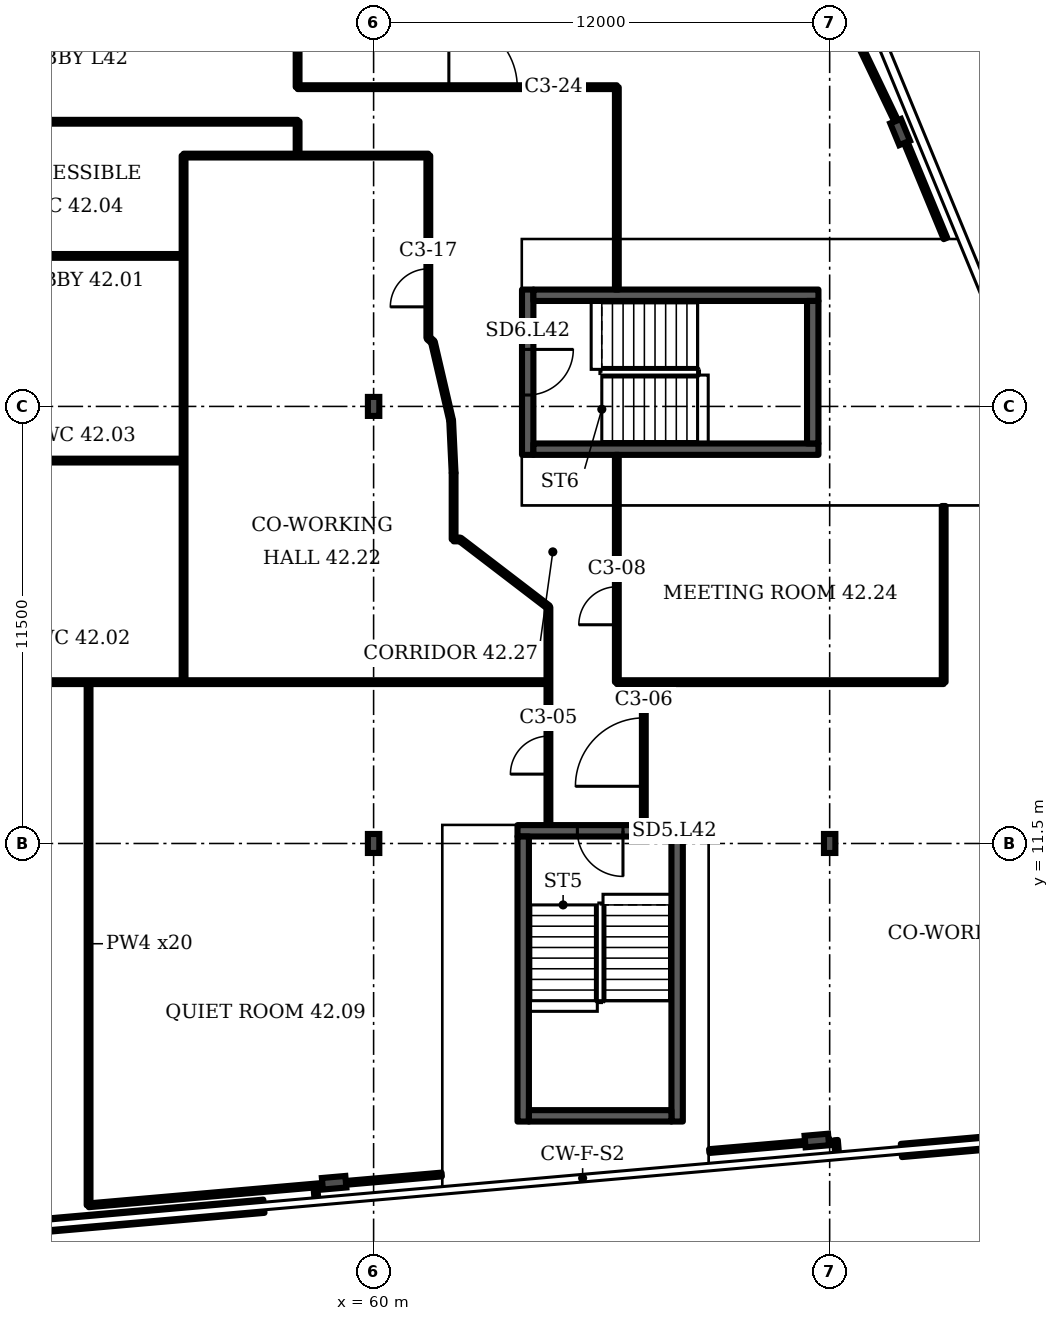
"""IFC4 building model, lengths in metres.
Left out: names, types, materials, properties, quantities, classifications, styles, units other than length and angle.
Written with IfcOpenShell. Run it as: python <this file> out.ifc"""

import sys

from ifc_helpers import new_model, si_unit, direction, frame, frame_2d, origin, origin_2d, place, context, subcontext, project, spatial, rectangle, i_section, extrude, element, fill, save


model = new_model("IFC4")
c1 = context("Model", 3, precision=1e-05, world=origin(), true_north=direction((0.0, 1.0)))
c2 = subcontext(c1, "Body", "Model", "MODEL_VIEW")
j1 = project(units=[si_unit("LENGTHUNIT", "METRE"), si_unit("PLANEANGLEUNIT", "RADIAN")], contexts=[c1])
p1 = place(None, origin())
s1 = spatial("IfcSite", under=j1, at=p1, CompositionType="ELEMENT")
p2 = place(p1, origin())
s2 = spatial("IfcBuilding", under=s1, at=p2, CompositionType="ELEMENT")
p3 = place(p2, frame((0.0, 0.0, 173.5)))
s3 = spatial("IfcBuildingStorey", under=s2, at=p3, CompositionType="ELEMENT", Elevation=173.5)
for number, where, z_axis, x_axis in (
    (1, (58.961, 2.573, 0.0), (0.0, 0.0, 1.0), (0.087, -0.996, 0.0)),
    (2, (71.662, 3.685, 0.0), (0.0, 0.0, 1.0), (0.087, -0.996, 0.0)),
    (3, (73.854, 30.219, 0.0), (0.0, 0.0, 1.0), (0.924, 0.382, 0.0)),
):
    element("IfcColumn", number, at=place(p3, frame(where, z_axis=z_axis, x_axis=x_axis)), inside=s3, PredefinedType="COLUMN", context=c2, shape_type="SweptSolid", body=[
        extrude(i_section(OverallWidth=0.305, OverallDepth=0.62, WebThickness=0.021, FlangeThickness=0.04, FilletRadius=0.027, at=origin_2d()), origin(), (0.0, 0.0, 1.0), 3.6),
    ])
for number, where, z_axis, x_axis in (
    (4, (60.0, 11.5, 0.0), (0.0, 0.0, 1.0), (1.0, 0.0, 0.0)),
    (5, (72.0, 11.5, 0.0), (0.0, 0.0, 1.0), (1.0, 0.0, 0.0)),
    (6, (60.0, 23.0, 0.0), (0.0, 0.0, 1.0), (1.0, 0.0, 0.0)),
):
    element("IfcColumn", number, at=place(p3, frame(where, z_axis=z_axis, x_axis=x_axis)), inside=s3, PredefinedType="COLUMN", context=c2, shape_type="SweptSolid", body=[
        extrude(i_section(OverallWidth=0.3, OverallDepth=0.5, WebThickness=0.014, FlangeThickness=0.028, FilletRadius=0.027, at=origin_2d()), origin(), (0.0, 0.0, 1.0), 3.6),
    ])
p4 = place(p3, frame((46.045, 0.987, 0.0), z_axis=(0.0, 0.0, 1.0), x_axis=(0.996193, 0.087171, 0.0)))
e7 = element("IfcWall", 7, at=p4, inside=s3, PredefinedType="SOLIDWALL", context=c2, shape_type="SweptSolid", body=[
    extrude(rectangle(XDim=11.11, YDim=0.35, at=frame_2d((5.555, 0.0))), origin(), (0.0, 0.0, 1.0), 1.0),
])
p5 = place(p3, frame((73.887, 3.423, 0.0), z_axis=(0.0, 0.0, 1.0), x_axis=(0.996197, 0.087145, 0.0)))
e8 = element("IfcWall", 8, at=p5, inside=s3, PredefinedType="SOLIDWALL", context=c2, shape_type="SweptSolid", body=[
    extrude(rectangle(XDim=9.323, YDim=0.35, at=frame_2d((4.662, 0.0))), origin(), (0.0, 0.0, 1.0), 1.0),
])
p6 = place(p3, frame((63.786, 11.834, 0.0), z_axis=(0.0, 0.0, 1.0), x_axis=(1.0, 0.0, 0.0)))
e9 = element("IfcWall", 9, at=p6, inside=s3, PredefinedType="SHEAR", context=c2, shape_type="SweptSolid", body=[
    extrude(rectangle(XDim=4.35, YDim=0.3, at=frame_2d((2.175, 0.0))), origin(), (0.0, 0.0, 1.0), 3.2),
])
p7 = place(p6, frame((1.575, 0.0, 0.0)))
e10 = element("IfcOpeningElement", 10, at=p7, cuts=e9, PredefinedType="OPENING", context=c2, shape_type="SweptSolid", body=[
    extrude(rectangle(XDim=1.2, YDim=2.1, at=frame_2d((0.6, 1.05))), frame((0.0, 0.16, 0.0), z_axis=(0.0, -1.0, 0.0), x_axis=(1.0, 0.0, 0.0)), (0.0, 0.0, 1.0), 0.32),
])
p8 = place(p3, frame((64.055, 21.725, 0.0), z_axis=(0.0, 0.0, 1.0), x_axis=(0.0, 1.0, 0.0)))
e11 = element("IfcWall", 11, at=p8, inside=s3, PredefinedType="SHEAR", context=c2, shape_type="SweptSolid", body=[
    extrude(rectangle(XDim=4.35, YDim=0.3, at=frame_2d((2.175, 0.0))), origin(), (0.0, 0.0, 1.0), 3.2),
])
p9 = place(p8, frame((1.575, 0.0, 0.0)))
e12 = element("IfcOpeningElement", 12, at=p9, cuts=e11, PredefinedType="OPENING", context=c2, shape_type="SweptSolid", body=[
    extrude(rectangle(XDim=1.2, YDim=2.1, at=frame_2d((0.6, 1.05))), frame((0.0, 0.16, 0.0), z_axis=(0.0, -1.0, 0.0), x_axis=(1.0, 0.0, 0.0)), (0.0, 0.0, 1.0), 0.32),
])
p10 = place(p3, frame((46.91, 15.745, 0.0), z_axis=(0.0, 0.0, 1.0), x_axis=(1.0, 0.0, 0.0)))
e13 = element("IfcWall", 13, at=p10, inside=s3, PredefinedType="PARTITIONING", context=c2, shape_type="SweptSolid", body=[
    extrude(rectangle(XDim=17.69, YDim=0.1, at=frame_2d((8.845, 0.0))), origin(), (0.0, 0.0, 1.0), 3.2),
])
p11 = place(p3, frame((46.91, 30.49, 0.0), z_axis=(0.0, 0.0, 1.0), x_axis=(1.0, 0.0, 0.0)))
e14 = element("IfcWall", 14, at=p11, inside=s3, PredefinedType="PARTITIONING", context=c2, shape_type="SweptSolid", body=[
    extrude(rectangle(XDim=11.09, YDim=0.1, at=frame_2d((5.545, 0.0))), origin(), (0.0, 0.0, 1.0), 3.2),
])
p12 = place(p11, frame((0.235, 0.0, 0.0)))
e15 = element("IfcOpeningElement", 15, at=p12, cuts=e14, PredefinedType="OPENING", context=c2, shape_type="SweptSolid", body=[
    extrude(rectangle(XDim=1.1, YDim=2.1, at=frame_2d((0.55, 1.05))), frame((0.0, 0.06, 0.0), z_axis=(0.0, -1.0, 0.0), x_axis=(1.0, 0.0, 0.0)), (0.0, 0.0, 1.0), 0.12),
])
for number, where, z_axis, x_axis in (
    (16, (48.7, 21.575, 0.0), (0.0, 0.0, 1.0), (1.0, 0.0, 0.0)),
    (17, (48.7, 26.96, 0.0), (0.0, 0.0, 1.0), (1.0, 0.0, 0.0)),
):
    element("IfcWall", number, at=place(p3, frame(where, z_axis=z_axis, x_axis=x_axis)), inside=s3, PredefinedType="PARTITIONING", context=c2, shape_type="SweptSolid", body=[
        extrude(rectangle(XDim=6.3, YDim=0.1, at=frame_2d((3.15, 0.0))), origin(), (0.0, 0.0, 1.0), 3.2),
    ])
p13 = place(p3, frame((52.5, 1.98, 0.0), z_axis=(0.0, 0.0, 1.0), x_axis=(0.0, 1.0, 0.0)))
e18 = element("IfcWall", 18, at=p13, inside=s3, PredefinedType="PARTITIONING", context=c2, shape_type="SweptSolid", body=[
    extrude(rectangle(XDim=13.765, YDim=0.1, at=frame_2d((6.883, 0.0))), origin(), (0.0, 0.0, 1.0), 3.2),
])
p14 = place(p3, frame((52.5, 1.98, 0.0), z_axis=(0.0, 0.0, 1.0), x_axis=(0.99622, 0.086844, 0.0)))
e19 = element("IfcWall", 19, at=p14, inside=s3, PredefinedType="PARTITIONING", context=c2, shape_type="SweptSolid", body=[
    extrude(rectangle(XDim=9.328, YDim=0.1, at=frame_2d((4.664, 0.0))), origin(), (0.0, 0.0, 1.0), 2.58),
])
p15 = place(p3, frame((55.0, 15.745, 0.0), z_axis=(0.0, 0.0, 1.0), x_axis=(0.0, 1.0, 0.0)))
e20 = element("IfcWall", 20, at=p15, inside=s3, PredefinedType="PARTITIONING", context=c2, shape_type="SweptSolid", body=[
    extrude(rectangle(XDim=13.855, YDim=0.1, at=frame_2d((6.927, 0.0))), origin(), (0.0, 0.0, 1.0), 3.2),
])
p16 = place(p3, frame((55.0, 29.6, 0.0), z_axis=(0.0, 0.0, 1.0), x_axis=(1.0, 0.0, 0.0)))
e21 = element("IfcWall", 21, at=p16, inside=s3, PredefinedType="PARTITIONING", context=c2, shape_type="SweptSolid", body=[
    extrude(rectangle(XDim=6.44, YDim=0.1, at=frame_2d((3.22, 0.0))), origin(), (0.0, 0.0, 1.0), 3.2),
])
p17 = place(p3, frame((58.0, 29.6, 0.0), z_axis=(0.0, 0.0, 1.0), x_axis=(0.0, 1.0, 0.0)))
e22 = element("IfcWall", 22, at=p17, inside=s3, PredefinedType="PARTITIONING", context=c2, shape_type="SweptSolid", body=[
    extrude(rectangle(XDim=0.9, YDim=0.1, at=frame_2d((0.45, 0.0))), origin(), (0.0, 0.0, 1.0), 3.2),
])
p18 = place(p3, frame((58.0, 31.4, 0.0), z_axis=(0.0, 0.0, 1.0), x_axis=(0.0, 1.0, 0.0)))
e23 = element("IfcWall", 23, at=p18, inside=s3, PredefinedType="PARTITIONING", context=c2, shape_type="SweptSolid", body=[
    extrude(rectangle(XDim=2.58, YDim=0.1, at=frame_2d((1.29, 0.0))), origin(), (0.0, 0.0, 1.0), 3.2),
])
p19 = place(p3, frame((58.0, 31.4, 0.0), z_axis=(0.0, 0.0, 1.0), x_axis=(1.0, 0.0, 0.0)))
e24 = element("IfcWall", 24, at=p19, inside=s3, PredefinedType="PARTITIONING", context=c2, shape_type="SweptSolid", body=[
    extrude(rectangle(XDim=8.4, YDim=0.1, at=frame_2d((4.2, 0.0))), origin(), (0.0, 0.0, 1.0), 3.2),
])
p20 = place(p19, frame((3.98, 0.0, 0.0)))
e25 = element("IfcOpeningElement", 25, at=p20, cuts=e24, PredefinedType="OPENING", context=c2, shape_type="SweptSolid", body=[
    extrude(rectangle(XDim=1.8, YDim=2.1, at=frame_2d((0.9, 1.05))), frame((0.0, 0.06, 0.0), z_axis=(0.0, -1.0, 0.0), x_axis=(1.0, 0.0, 0.0)), (0.0, 0.0, 1.0), 0.12),
])
p21 = place(p3, frame((58.498, 2.102, 0.0), z_axis=(0.0, 0.0, 1.0), x_axis=(-0.083045, 0.996542, 0.0)))
e26 = element("IfcWall", 26, at=p21, inside=s3, PredefinedType="PARTITIONING", context=c2, shape_type="SweptSolid", body=[
    extrude(rectangle(XDim=0.4, YDim=0.1, at=frame_2d((0.2, 0.0))), origin(), (0.0, 0.0, 1.0), 3.2),
])
p22 = place(p3, frame((61.44, 24.8, 0.0), z_axis=(0.0, 0.0, 1.0), x_axis=(0.0, 1.0, 0.0)))
e27 = element("IfcWall", 27, at=p22, inside=s3, PredefinedType="PARTITIONING", context=c2, shape_type="SweptSolid", body=[
    extrude(rectangle(XDim=4.8, YDim=0.1, at=frame_2d((2.4, 0.0))), origin(), (0.0, 0.0, 1.0), 3.2),
])
p23 = place(p22, frame((0.82, 0.0, 0.0)))
e28 = element("IfcOpeningElement", 28, at=p23, cuts=e27, PredefinedType="OPENING", context=c2, shape_type="SweptSolid", body=[
    extrude(rectangle(XDim=1.0, YDim=2.1, at=frame_2d((0.5, 1.05))), frame((0.0, 0.06, 0.0), z_axis=(0.0, -1.0, 0.0), x_axis=(1.0, 0.0, 0.0)), (0.0, 0.0, 1.0), 0.12),
])
p24 = place(p3, frame((61.56, 24.695, 0.0), z_axis=(0.0, 0.0, 1.0), x_axis=(-0.752958, 0.658073, 0.0)))
e29 = element("IfcWall", 29, at=p24, inside=s3, PredefinedType="PARTITIONING", context=c2, shape_type="SweptSolid", body=[
    extrude(rectangle(XDim=0.159, YDim=0.1, at=frame_2d((0.08, 0.0))), origin(), (0.0, 0.0, 1.0), 3.2),
])
p25 = place(p3, frame((62.04, 22.63, 0.0), z_axis=(0.0, 0.0, 1.0), x_axis=(-0.226381, 0.974037, 0.0)))
e30 = element("IfcWall", 30, at=p25, inside=s3, PredefinedType="PARTITIONING", context=c2, shape_type="SweptSolid", body=[
    extrude(rectangle(XDim=2.12, YDim=0.1, at=frame_2d((1.06, 0.0))), origin(), (0.0, 0.0, 1.0), 3.2),
])
p26 = place(p3, frame((62.105, 19.5, 0.0), z_axis=(0.0, 0.0, 1.0), x_axis=(0.0, 1.0, 0.0)))
e31 = element("IfcWall", 31, at=p26, inside=s3, PredefinedType="PARTITIONING", context=c2, shape_type="SweptSolid", body=[
    extrude(rectangle(XDim=1.75, YDim=0.1, at=frame_2d((0.875, 0.0))), origin(), (0.0, 0.0, 1.0), 3.2),
])
p27 = place(p3, frame((62.105, 19.5, 0.0), z_axis=(0.0, 0.0, 1.0), x_axis=(1.0, 0.0, 0.0)))
e32 = element("IfcWall", 32, at=p27, inside=s3, PredefinedType="PARTITIONING", context=c2, shape_type="SweptSolid", body=[
    extrude(rectangle(XDim=0.17, YDim=0.1, at=frame_2d((0.085, 0.0))), origin(), (0.0, 0.0, 1.0), 3.2),
])
p28 = place(p3, frame((62.105, 21.25, 0.0), z_axis=(0.0, 0.0, 1.0), x_axis=(-0.047011, 0.998895, 0.0)))
e33 = element("IfcWall", 33, at=p28, inside=s3, PredefinedType="PARTITIONING", context=c2, shape_type="SweptSolid", body=[
    extrude(rectangle(XDim=1.381, YDim=0.1, at=frame_2d((0.691, 0.0))), origin(), (0.0, 0.0, 1.0), 3.2),
])
p29 = place(p3, frame((64.6, 12.004, 0.0), z_axis=(0.0, 0.0, 1.0), x_axis=(0.0, 1.0, 0.0)))
e34 = element("IfcWall", 34, at=p29, inside=s3, PredefinedType="PARTITIONING", context=c2, shape_type="SweptSolid", body=[
    extrude(rectangle(XDim=5.716, YDim=0.1, at=frame_2d((2.858, 0.0))), origin(), (0.0, 0.0, 1.0), 3.2),
])
p30 = place(p29, frame((1.321, 0.0, 0.0)))
e35 = element("IfcOpeningElement", 35, at=p30, cuts=e34, PredefinedType="OPENING", context=c2, shape_type="SweptSolid", body=[
    extrude(rectangle(XDim=1.0, YDim=2.1, at=frame_2d((0.5, 1.05))), frame((0.0, 0.06, 0.0), z_axis=(0.0, -1.0, 0.0), x_axis=(1.0, 0.0, 0.0)), (0.0, 0.0, 1.0), 0.12),
])
p31 = place(p3, frame((64.6, 17.72, 0.0), z_axis=(0.0, 0.0, 1.0), x_axis=(-0.794036, 0.607866, 0.0)))
e36 = element("IfcWall", 36, at=p31, inside=s3, PredefinedType="PARTITIONING", context=c2, shape_type="SweptSolid", body=[
    extrude(rectangle(XDim=2.928, YDim=0.1, at=frame_2d((1.464, 0.0))), origin(), (0.0, 0.0, 1.0), 3.2),
])
p32 = place(p3, frame((66.4, 15.745, 0.0), z_axis=(0.0, 0.0, 1.0), x_axis=(0.0, 1.0, 0.0)))
e37 = element("IfcWall", 37, at=p32, inside=s3, PredefinedType="PARTITIONING", context=c2, shape_type="SweptSolid", body=[
    extrude(rectangle(XDim=5.98, YDim=0.1, at=frame_2d((2.99, 0.0))), origin(), (0.0, 0.0, 1.0), 3.2),
])
p33 = place(p32, frame((1.51, 0.0, 0.0)))
e38 = element("IfcOpeningElement", 38, at=p33, cuts=e37, PredefinedType="OPENING", context=c2, shape_type="SweptSolid", body=[
    extrude(rectangle(XDim=1.0, YDim=2.1, at=frame_2d((0.5, 1.05))), frame((0.0, 0.06, 0.0), z_axis=(0.0, -1.0, 0.0), x_axis=(1.0, 0.0, 0.0)), (0.0, 0.0, 1.0), 0.12),
])
p34 = place(p3, frame((66.4, 15.745, 0.0), z_axis=(0.0, 0.0, 1.0), x_axis=(1.0, 0.0, 0.0)))
e39 = element("IfcWall", 39, at=p34, inside=s3, PredefinedType="PARTITIONING", context=c2, shape_type="SweptSolid", body=[
    extrude(rectangle(XDim=8.6, YDim=0.1, at=frame_2d((4.3, 0.0))), origin(), (0.0, 0.0, 1.0), 3.2),
])
p35 = place(p3, frame((66.4, 26.075, 0.0), z_axis=(0.0, 0.0, 1.0), x_axis=(0.0, 1.0, 0.0)))
e40 = element("IfcWall", 40, at=p35, inside=s3, PredefinedType="PARTITIONING", context=c2, shape_type="SweptSolid", body=[
    extrude(rectangle(XDim=5.325, YDim=0.1, at=frame_2d((2.663, 0.0))), origin(), (0.0, 0.0, 1.0), 3.2),
])
p36 = place(p3, frame((67.11, 12.004, 0.0), z_axis=(0.0, 0.0, 1.0), x_axis=(0.0, 1.0, 0.0)))
e41 = element("IfcWall", 41, at=p36, inside=s3, PredefinedType="PARTITIONING", context=c2, shape_type="SweptSolid", body=[
    extrude(rectangle(XDim=3.741, YDim=0.1, at=frame_2d((1.871, 0.0))), origin(), (0.0, 0.0, 1.0), 3.2),
])
p37 = place(p36, frame((1.001, 0.0, 0.0)))
e42 = element("IfcOpeningElement", 42, at=p37, cuts=e41, PredefinedType="OPENING", context=c2, shape_type="SweptSolid", body=[
    extrude(rectangle(XDim=1.8, YDim=2.1, at=frame_2d((0.9, 1.05))), frame((0.0, 0.06, 0.0), z_axis=(0.0, -1.0, 0.0), x_axis=(1.0, 0.0, 0.0)), (0.0, 0.0, 1.0), 0.12),
])
p38 = place(p3, frame((68.831, 3.407, 0.0), z_axis=(0.0, 0.0, 1.0), x_axis=(0.996308, 0.085898, 0.0)))
e43 = element("IfcWall", 43, at=p38, inside=s3, PredefinedType="PARTITIONING", context=c2, shape_type="SweptSolid", body=[
    extrude(rectangle(XDim=3.18, YDim=0.1, at=frame_2d((1.59, 0.0))), origin(), (0.0, 0.0, 1.0), 2.58),
])
p39 = place(p3, frame((72.198, 3.3, 0.0), z_axis=(0.0, 0.0, 1.0), x_axis=(-0.083759, 0.996486, 0.0)))
e44 = element("IfcWall", 44, at=p39, inside=s3, PredefinedType="PARTITIONING", context=c2, shape_type="SweptSolid", body=[
    extrude(rectangle(XDim=0.396, YDim=0.1, at=frame_2d((0.198, 0.0))), origin(), (0.0, 0.0, 1.0), 3.2),
])
p40 = place(p3, frame((73.885, 30.23, 0.0), z_axis=(0.0, 0.0, 1.0), x_axis=(-0.432129, 0.901808, 0.0)))
e45 = element("IfcWall", 45, at=p40, inside=s3, PredefinedType="PARTITIONING", context=c2, shape_type="SweptSolid", body=[
    extrude(rectangle(XDim=13.029, YDim=0.1, at=frame_2d((6.515, 0.0))), origin(), (0.0, 0.0, 1.0), 2.58),
])
p41 = place(p3, frame((75.0, 15.745, 0.0), z_axis=(0.0, 0.0, 1.0), x_axis=(0.0, 1.0, 0.0)))
e46 = element("IfcWall", 46, at=p41, inside=s3, PredefinedType="PARTITIONING", context=c2, shape_type="SweptSolid", body=[
    extrude(rectangle(XDim=4.635, YDim=0.1, at=frame_2d((2.317, 0.0))), origin(), (0.0, 0.0, 1.0), 3.2),
])
p42 = place(p3, frame((75.047, 27.42, 0.0), z_axis=(0.0, 0.0, 1.0), x_axis=(-0.382024, 0.924148, 0.0)))
e47 = element("IfcWall", 47, at=p42, inside=s3, PredefinedType="PARTITIONING", context=c2, shape_type="SweptSolid", body=[
    extrude(rectangle(XDim=3.041, YDim=0.1, at=frame_2d((1.521, 0.0))), origin(), (0.0, 0.0, 1.0), 2.58),
])
for number, where, z_axis, x_axis in (
    (48, (63.936, 4.184, 0.0), (0.0, 0.0, 1.0), (0.0, 1.0, 0.0)),
    (49, (67.986, 4.184, 0.0), (0.0, 0.0, 1.0), (0.0, 1.0, 0.0)),
):
    element("IfcWall", number, at=place(p3, frame(where, z_axis=z_axis, x_axis=x_axis)), inside=s3, PredefinedType="SHEAR", context=c2, shape_type="SweptSolid", body=[
        extrude(rectangle(XDim=7.5, YDim=0.3, at=frame_2d((3.75, 0.0))), origin(), (0.0, 0.0, 1.0), 3.2),
    ])
p43 = place(p3, frame((64.086, 4.334, 0.0), z_axis=(0.0, 0.0, 1.0), x_axis=(1.0, 0.0, 0.0)))
e50 = element("IfcWall", 50, at=p43, inside=s3, PredefinedType="SHEAR", context=c2, shape_type="SweptSolid", body=[
    extrude(rectangle(XDim=3.75, YDim=0.3, at=frame_2d((1.875, 0.0))), origin(), (0.0, 0.0, 1.0), 3.2),
])
for number, where, z_axis, x_axis in (
    (51, (64.205, 21.875, 0.0), (0.0, 0.0, 1.0), (1.0, 0.0, 0.0)),
    (52, (64.205, 25.925, 0.0), (0.0, 0.0, 1.0), (1.0, 0.0, 0.0)),
):
    element("IfcWall", number, at=place(p3, frame(where, z_axis=z_axis, x_axis=x_axis)), inside=s3, PredefinedType="SHEAR", context=c2, shape_type="SweptSolid", body=[
        extrude(rectangle(XDim=7.5, YDim=0.3, at=frame_2d((3.75, 0.0))), origin(), (0.0, 0.0, 1.0), 3.2),
    ])
p44 = place(p3, frame((71.555, 22.025, 0.0), z_axis=(0.0, 0.0, 1.0), x_axis=(0.0, 1.0, 0.0)))
e53 = element("IfcWall", 53, at=p44, inside=s3, PredefinedType="SHEAR", context=c2, shape_type="SweptSolid", body=[
    extrude(rectangle(XDim=3.75, YDim=0.3, at=frame_2d((1.875, 0.0))), origin(), (0.0, 0.0, 1.0), 3.2),
])
p45 = place(p7, origin())
e54 = element("IfcDoor", 54, at=p45, inside=s3, OperationType="SINGLE_SWING_RIGHT", PredefinedType="DOOR", context=c2, shape_type="SweptSolid", body=[
    extrude(rectangle(XDim=1.2, YDim=2.1, at=frame_2d((0.6, 1.05))), frame((0.0, 0.025, 0.0), z_axis=(0.0, -1.0, 0.0), x_axis=(1.0, 0.0, 0.0)), (0.0, 0.0, 1.0), 0.05),
])
fill(e10, e54)
p46 = place(p9, origin())
e55 = element("IfcDoor", 55, at=p46, inside=s3, OperationType="SINGLE_SWING_RIGHT", PredefinedType="DOOR", context=c2, shape_type="SweptSolid", body=[
    extrude(rectangle(XDim=1.2, YDim=2.1, at=frame_2d((0.6, 1.05))), frame((0.0, 0.025, 0.0), z_axis=(0.0, -1.0, 0.0), x_axis=(1.0, 0.0, 0.0)), (0.0, 0.0, 1.0), 0.05),
])
fill(e12, e55)
p47 = place(p30, origin())
e56 = element("IfcDoor", 56, at=p47, inside=s3, OperationType="SINGLE_SWING_LEFT", PredefinedType="DOOR", context=c2, shape_type="SweptSolid", body=[
    extrude(rectangle(XDim=1.0, YDim=2.1, at=frame_2d((0.5, 1.05))), frame((0.0, 0.025, 0.0), z_axis=(0.0, -1.0, 0.0), x_axis=(1.0, 0.0, 0.0)), (0.0, 0.0, 1.0), 0.05),
])
fill(e35, e56)
p48 = place(p37, origin())
e57 = element("IfcDoor", 57, at=p48, inside=s3, OperationType="DOUBLE_DOOR_SINGLE_SWING", PredefinedType="DOOR", context=c2, shape_type="SweptSolid", body=[
    extrude(rectangle(XDim=1.8, YDim=2.1, at=frame_2d((0.9, 1.05))), frame((0.0, 0.025, 0.0), z_axis=(0.0, -1.0, 0.0), x_axis=(1.0, 0.0, 0.0)), (0.0, 0.0, 1.0), 0.05),
])
fill(e42, e57)
p49 = place(p33, origin())
e58 = element("IfcDoor", 58, at=p49, inside=s3, OperationType="SINGLE_SWING_LEFT", PredefinedType="DOOR", context=c2, shape_type="SweptSolid", body=[
    extrude(rectangle(XDim=1.0, YDim=2.1, at=frame_2d((0.5, 1.05))), frame((0.0, 0.025, 0.0), z_axis=(0.0, -1.0, 0.0), x_axis=(1.0, 0.0, 0.0)), (0.0, 0.0, 1.0), 0.05),
])
fill(e38, e58)
p50 = place(p23, origin())
e59 = element("IfcDoor", 59, at=p50, inside=s3, OperationType="SINGLE_SWING_LEFT", PredefinedType="DOOR", context=c2, shape_type="SweptSolid", body=[
    extrude(rectangle(XDim=1.0, YDim=2.1, at=frame_2d((0.5, 1.05))), frame((0.0, 0.025, 0.0), z_axis=(0.0, -1.0, 0.0), x_axis=(1.0, 0.0, 0.0)), (0.0, 0.0, 1.0), 0.05),
])
fill(e28, e59)
p51 = place(p20, origin())
e60 = element("IfcDoor", 60, at=p51, inside=s3, OperationType="DOUBLE_DOOR_SINGLE_SWING", PredefinedType="DOOR", context=c2, shape_type="SweptSolid", body=[
    extrude(rectangle(XDim=1.8, YDim=2.1, at=frame_2d((0.9, 1.05))), frame((0.0, 0.025, 0.0), z_axis=(0.0, -1.0, 0.0), x_axis=(1.0, 0.0, 0.0)), (0.0, 0.0, 1.0), 0.05),
])
fill(e25, e60)
save(model, sys.argv[1])
